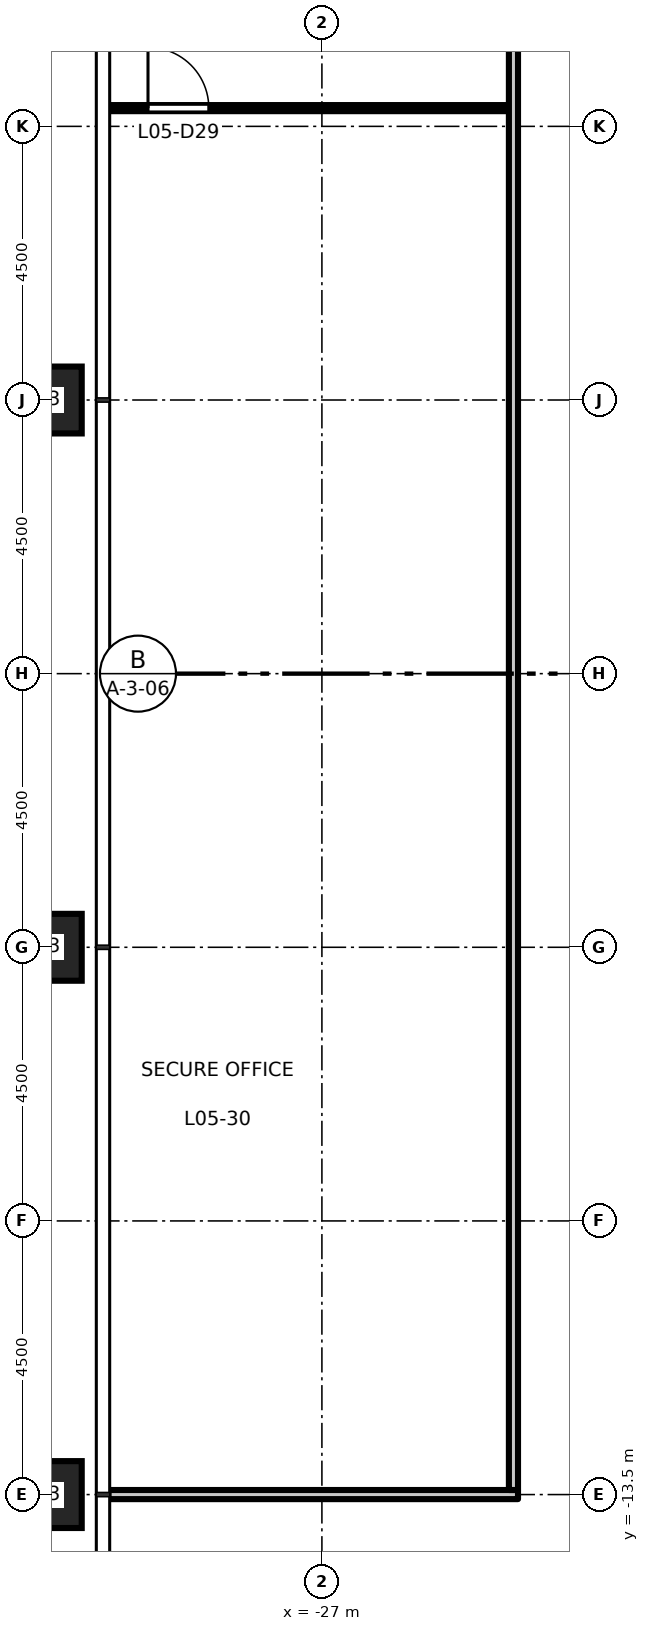
"""IFC4 building model, lengths in metres.
Left out: names, types, materials, properties, quantities, classifications, styles, units other than length and angle.
Written with IfcOpenShell. Run it as: python <this file> out.ifc"""

import sys

from ifc_helpers import new_model, si_unit, direction, frame, frame_2d, origin, origin_2d, place, context, subcontext, project, spatial, rectangle, hollow_rectangle, extrude, element, fill, save


model = new_model("IFC4")
c1 = context("Model", 3, precision=1e-05, world=origin(), true_north=direction((0.0, 1.0)))
c2 = subcontext(c1, "Body", "Model", "MODEL_VIEW")
j1 = project(units=[si_unit("LENGTHUNIT", "METRE"), si_unit("PLANEANGLEUNIT", "RADIAN")], contexts=[c1])
p1 = place(None, origin())
s1 = spatial("IfcSite", under=j1, at=p1, CompositionType="ELEMENT")
p2 = place(p1, origin())
s2 = spatial("IfcBuilding", under=s1, at=p2, CompositionType="ELEMENT")
p3 = place(p2, frame((0.0, 0.0, 26.7)))
s3 = spatial("IfcBuildingStorey", under=s2, at=p3, CompositionType="ELEMENT", Elevation=26.7)
for number, where, z_axis, x_axis in (
    (1, (-31.5, 4.5, 0.0), (0.0, 0.0, 1.0), (1.0, 0.0, 0.0)),
    (2, (-31.5, -4.5, 0.0), (0.0, 0.0, 1.0), (1.0, 0.0, 0.0)),
    (3, (-31.5, -13.5, 0.0), (0.0, 0.0, 1.0), (1.0, 0.0, 0.0)),
):
    element("IfcColumn", number, at=place(p3, frame(where, z_axis=z_axis, x_axis=x_axis)), inside=s3, PredefinedType="COLUMN", context=c2, shape_type="SweptSolid", body=[
        extrude(hollow_rectangle(XDim=1.1, YDim=1.1, WallThickness=0.07, at=origin_2d()), origin(), (0.0, 0.0, 1.0), 4.5),
    ])
p4 = place(p3, frame((-30.51, -13.5, 0.0), z_axis=(0.0, 0.0, 1.0), x_axis=(1.0, 0.0, 0.0)))
e4 = element("IfcWall", 4, at=p4, inside=s3, PredefinedType="PARTITIONING", context=c2, shape_type="SweptSolid", body=[
    extrude(rectangle(XDim=6.735, YDim=0.15, at=frame_2d((3.368, 0.0))), origin(), (0.0, 0.0, 1.0), 3.35),
])
p5 = place(p3, frame((-30.51, 9.3, 0.0), z_axis=(0.0, 0.0, 1.0), x_axis=(1.0, 0.0, 0.0)))
e5 = element("IfcWall", 5, at=p5, inside=s3, PredefinedType="PARTITIONING", context=c2, shape_type="SweptSolid", body=[
    extrude(rectangle(XDim=6.585, YDim=0.1, at=frame_2d((3.292, 0.0))), origin(), (0.0, 0.0, 1.0), 4.35),
])
p6 = place(p5, frame((0.65, 0.0, 0.0)))
e6 = element("IfcOpeningElement", 6, at=p6, cuts=e5, PredefinedType="OPENING", context=c2, shape_type="SweptSolid", body=[
    extrude(rectangle(XDim=1.0, YDim=2.1, at=frame_2d((0.5, 1.05))), frame((0.0, 0.06, 0.0), z_axis=(0.0, -1.0, 0.0), x_axis=(1.0, 0.0, 0.0)), (0.0, 0.0, 1.0), 0.12),
])
p7 = place(p3, frame((-23.85, -13.425, 0.0), z_axis=(0.0, 0.0, 1.0), x_axis=(0.0, 1.0, 0.0)))
e7 = element("IfcWall", 7, at=p7, inside=s3, PredefinedType="PARTITIONING", context=c2, shape_type="SweptSolid", body=[
    extrude(rectangle(XDim=26.85, YDim=0.15, at=frame_2d((13.425, 0.0))), origin(), (0.0, 0.0, 1.0), 4.35),
])
p8 = place(p6, origin())
e8 = element("IfcDoor", 8, at=p8, inside=s3, OperationType="SINGLE_SWING_LEFT", PredefinedType="DOOR", context=c2, shape_type="SweptSolid", body=[
    extrude(rectangle(XDim=1.0, YDim=2.1, at=frame_2d((0.5, 1.05))), frame((0.0, 0.025, 0.0), z_axis=(0.0, -1.0, 0.0), x_axis=(1.0, 0.0, 0.0)), (0.0, 0.0, 1.0), 0.05),
])
fill(e6, e8)
save(model, sys.argv[1])
